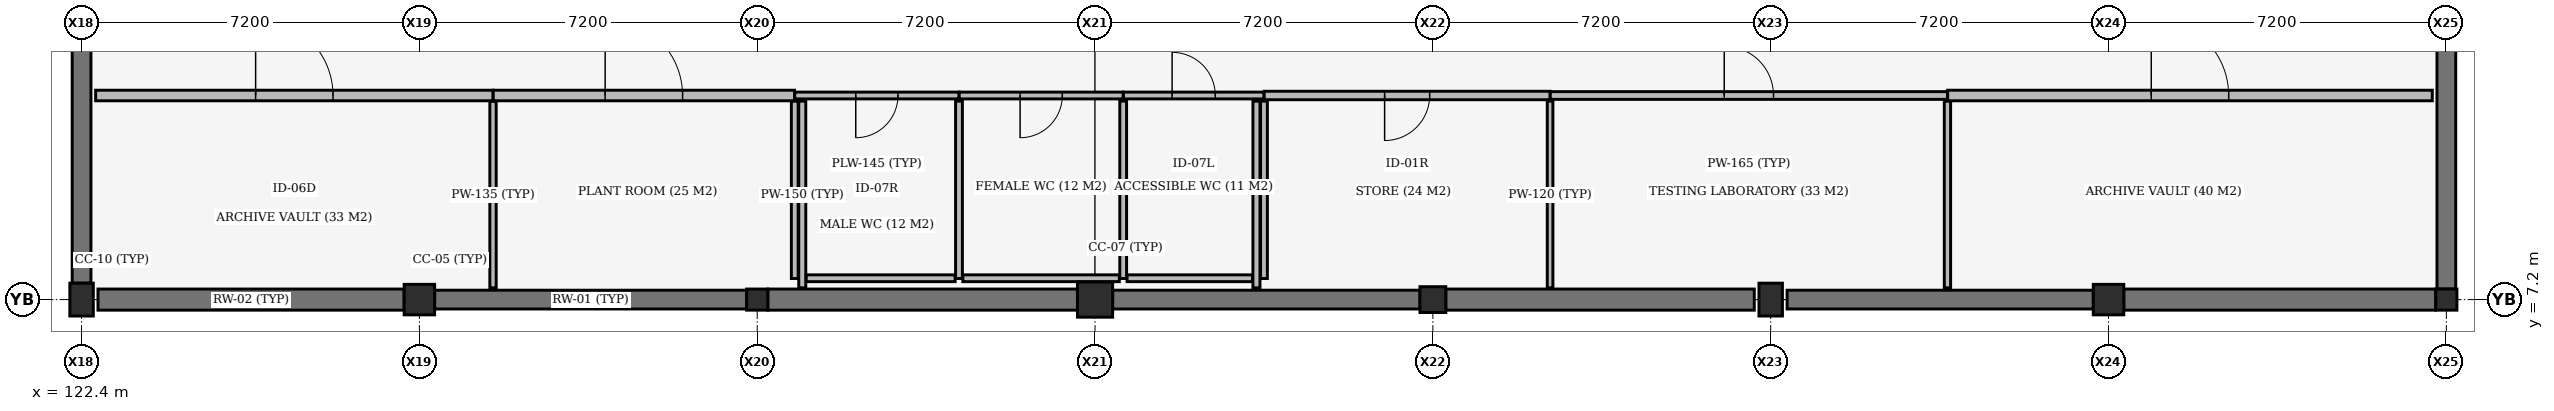
"""IFC4 building model, lengths in metres.
Left out: names, types, materials, properties, quantities, classifications, styles, units other than length and angle.
Written with IfcOpenShell. Run it as: python <this file> out.ifc"""

import sys

from ifc_helpers import new_model, si_unit, direction, frame, frame_2d, origin, origin_2d, place, context, subcontext, project, spatial, rectangle, extrude, element, fill, save


model = new_model("IFC4")
c1 = context("Model", 3, precision=1e-05, world=origin(), true_north=direction((0.0, 1.0)))
c2 = subcontext(c1, "Body", "Model", "MODEL_VIEW")
j1 = project(units=[si_unit("LENGTHUNIT", "METRE"), si_unit("PLANEANGLEUNIT", "RADIAN")], contexts=[c1])
p1 = place(None, origin())
s1 = spatial("IfcSite", under=j1, at=p1, CompositionType="ELEMENT")
p2 = place(p1, origin())
s2 = spatial("IfcBuilding", under=s1, at=p2, CompositionType="ELEMENT")
p3 = place(p2, frame((0.0, 0.0, -4.5)))
s3 = spatial("IfcBuildingStorey", under=s2, at=p3, CompositionType="ELEMENT", Elevation=-4.5)
p4 = place(p3, frame((122.4, 7.2, -0.42), z_axis=(0.0, 0.0, 1.0), x_axis=(1.0, 0.0, 0.0)))
e1 = element("IfcColumn", 1, at=p4, inside=s3, PredefinedType="COLUMN", context=c2, shape_type="SweptSolid", body=[
    extrude(rectangle(XDim=0.5, YDim=0.7, at=origin_2d()), origin(), (0.0, 0.0, 1.0), 4.6),
])
p5 = place(p3, frame((129.6, 7.2, -0.42), z_axis=(0.0, 0.0, 1.0), x_axis=(1.0, 0.0, 0.0)))
e2 = element("IfcColumn", 2, at=p5, inside=s3, PredefinedType="COLUMN", context=c2, shape_type="SweptSolid", body=[
    extrude(rectangle(XDim=0.65, YDim=0.65, at=origin_2d()), origin(), (0.0, 0.0, 1.0), 4.6),
])
p6 = place(p3, frame((136.8, 7.2, -0.42), z_axis=(0.0, 0.0, 1.0), x_axis=(1.0, 0.0, 0.0)))
e3 = element("IfcColumn", 3, at=p6, inside=s3, PredefinedType="COLUMN", context=c2, shape_type="SweptSolid", body=[
    extrude(rectangle(XDim=0.45, YDim=0.45, at=origin_2d()), origin(), (0.0, 0.0, 1.0), 4.6),
])
p7 = place(p3, frame((144.0, 7.2, -0.42), z_axis=(0.0, 0.0, 1.0), x_axis=(1.0, 0.0, 0.0)))
e4 = element("IfcColumn", 4, at=p7, inside=s3, PredefinedType="COLUMN", context=c2, shape_type="SweptSolid", body=[
    extrude(rectangle(XDim=0.75, YDim=0.75, at=origin_2d()), origin(), (0.0, 0.0, 1.0), 4.6),
])
p8 = place(p3, frame((151.2, 7.2, -0.42), z_axis=(0.0, 0.0, 1.0), x_axis=(1.0, 0.0, 0.0)))
e5 = element("IfcColumn", 5, at=p8, inside=s3, PredefinedType="COLUMN", context=c2, shape_type="SweptSolid", body=[
    extrude(rectangle(XDim=0.55, YDim=0.55, at=origin_2d()), origin(), (0.0, 0.0, 1.0), 4.6),
])
p9 = place(p3, frame((158.4, 7.2, -0.42), z_axis=(0.0, 0.0, 1.0), x_axis=(1.0, 0.0, 0.0)))
e6 = element("IfcColumn", 6, at=p9, inside=s3, PredefinedType="COLUMN", context=c2, shape_type="SweptSolid", body=[
    extrude(rectangle(XDim=0.5, YDim=0.7, at=origin_2d()), origin(), (0.0, 0.0, 1.0), 4.6),
])
p10 = place(p3, frame((165.6, 7.2, -0.42), z_axis=(0.0, 0.0, 1.0), x_axis=(1.0, 0.0, 0.0)))
e7 = element("IfcColumn", 7, at=p10, inside=s3, PredefinedType="COLUMN", context=c2, shape_type="SweptSolid", body=[
    extrude(rectangle(XDim=0.65, YDim=0.65, at=origin_2d()), origin(), (0.0, 0.0, 1.0), 4.6),
])
p11 = place(p3, frame((172.8, 7.2, -0.42), z_axis=(0.0, 0.0, 1.0), x_axis=(1.0, 0.0, 0.0)))
e8 = element("IfcColumn", 8, at=p11, inside=s3, PredefinedType="COLUMN", context=c2, shape_type="SweptSolid", body=[
    extrude(rectangle(XDim=0.45, YDim=0.45, at=origin_2d()), origin(), (0.0, 0.0, 1.0), 4.6),
])
p12 = place(p3, frame((122.75, 7.2, 0.0), z_axis=(0.0, 0.0, 1.0), x_axis=(1.0, 0.0, 0.0)))
e9 = element("IfcWall", 9, at=p12, inside=s3, PredefinedType="USERDEFINED", context=c2, shape_type="SweptSolid", body=[
    extrude(rectangle(XDim=6.525, YDim=0.45, at=frame_2d((3.262, 0.0))), origin(), (0.0, 0.0, 1.0), 4.18),
])
p13 = place(p3, frame((129.925, 7.2, 0.0), z_axis=(0.0, 0.0, 1.0), x_axis=(1.0, 0.0, 0.0)))
e10 = element("IfcWall", 10, at=p13, inside=s3, PredefinedType="USERDEFINED", context=c2, shape_type="SweptSolid", body=[
    extrude(rectangle(XDim=6.65, YDim=0.4, at=frame_2d((3.325, 0.0))), origin(), (0.0, 0.0, 1.0), 4.18),
])
p14 = place(p3, frame((137.025, 7.2, 0.0), z_axis=(0.0, 0.0, 1.0), x_axis=(1.0, 0.0, 0.0)))
e11 = element("IfcWall", 11, at=p14, inside=s3, PredefinedType="USERDEFINED", context=c2, shape_type="SweptSolid", body=[
    extrude(rectangle(XDim=6.6, YDim=0.45, at=frame_2d((3.3, 0.0))), origin(), (0.0, 0.0, 1.0), 4.18),
])
p15 = place(p3, frame((144.375, 7.2, 0.0), z_axis=(0.0, 0.0, 1.0), x_axis=(1.0, 0.0, 0.0)))
e12 = element("IfcWall", 12, at=p15, inside=s3, PredefinedType="USERDEFINED", context=c2, shape_type="SweptSolid", body=[
    extrude(rectangle(XDim=6.55, YDim=0.4, at=frame_2d((3.275, 0.0))), origin(), (0.0, 0.0, 1.0), 4.18),
])
p16 = place(p3, frame((151.475, 7.2, 0.0), z_axis=(0.0, 0.0, 1.0), x_axis=(1.0, 0.0, 0.0)))
e13 = element("IfcWall", 13, at=p16, inside=s3, PredefinedType="USERDEFINED", context=c2, shape_type="SweptSolid", body=[
    extrude(rectangle(XDim=6.575, YDim=0.45, at=frame_2d((3.288, 0.0))), origin(), (0.0, 0.0, 1.0), 4.18),
])
p17 = place(p3, frame((158.75, 7.2, 0.0), z_axis=(0.0, 0.0, 1.0), x_axis=(1.0, 0.0, 0.0)))
e14 = element("IfcWall", 14, at=p17, inside=s3, PredefinedType="USERDEFINED", context=c2, shape_type="SweptSolid", body=[
    extrude(rectangle(XDim=6.525, YDim=0.4, at=frame_2d((3.262, 0.0))), origin(), (0.0, 0.0, 1.0), 4.18),
])
p18 = place(p3, frame((165.925, 7.2, 0.0), z_axis=(0.0, 0.0, 1.0), x_axis=(1.0, 0.0, 0.0)))
e15 = element("IfcWall", 15, at=p18, inside=s3, PredefinedType="USERDEFINED", context=c2, shape_type="SweptSolid", body=[
    extrude(rectangle(XDim=6.65, YDim=0.45, at=frame_2d((3.325, 0.0))), origin(), (0.0, 0.0, 1.0), 4.18),
])
p19 = place(p3, frame((122.4, 7.55, 0.0), z_axis=(0.0, 0.0, 1.0), x_axis=(0.0, 1.0, 0.0)))
e16 = element("IfcWall", 16, at=p19, inside=s3, PredefinedType="USERDEFINED", context=c2, shape_type="SweptSolid", body=[
    extrude(rectangle(XDim=6.425, YDim=0.4, at=frame_2d((3.212, 0.0))), origin(), (0.0, 0.0, 1.0), 4.18),
])
p20 = place(p3, frame((172.8, 7.425, 0.0), z_axis=(0.0, 0.0, 1.0), x_axis=(0.0, 1.0, 0.0)))
e17 = element("IfcWall", 17, at=p20, inside=s3, PredefinedType="USERDEFINED", context=c2, shape_type="SweptSolid", body=[
    extrude(rectangle(XDim=6.725, YDim=0.4, at=frame_2d((3.362, 0.0))), origin(), (0.0, 0.0, 1.0), 4.18),
])
p21 = place(p3, frame((137.6, 11.55, 0.0), z_axis=(0.0, 0.0, 1.0), x_axis=(1.0, 0.0, 0.0)))
e18 = element("IfcWall", 18, at=p21, inside=s3, PredefinedType="PLUMBINGWALL", context=c2, shape_type="SweptSolid", body=[
    extrude(rectangle(XDim=3.5, YDim=0.145, at=frame_2d((1.75, 0.0))), origin(), (0.0, 0.0, 1.0), 3.91),
])
p22 = place(p21, frame((1.3, 0.0, 0.0)))
e19 = element("IfcOpeningElement", 19, at=p22, cuts=e18, PredefinedType="OPENING", context=c2, shape_type="SweptSolid", body=[
    extrude(rectangle(XDim=0.9, YDim=2.1, at=frame_2d((0.45, 1.05))), frame((0.0, 0.083, 0.0), z_axis=(0.0, -1.0, 0.0), x_axis=(1.0, 0.0, 0.0)), (0.0, 0.0, 1.0), 0.165),
])
for number, where, z_axis, x_axis in (
    (20, (137.6, 7.65, 0.0), (0.0, 0.0, 1.0), (0.0, 1.0, 0.0)),
    (21, (141.1, 7.65, 0.0), (0.0, 0.0, 1.0), (0.0, 1.0, 0.0)),
):
    element("IfcWall", number, at=place(p3, frame(where, z_axis=z_axis, x_axis=x_axis)), inside=s3, PredefinedType="PLUMBINGWALL", context=c2, shape_type="SweptSolid", body=[
        extrude(rectangle(XDim=3.78, YDim=0.145, at=frame_2d((1.89, 0.0))), origin(), (0.0, 0.0, 1.0), 4.18),
    ])
p23 = place(p3, frame((141.105, 11.55, 0.0), z_axis=(0.0, 0.0, 1.0), x_axis=(1.0, 0.0, 0.0)))
e22 = element("IfcWall", 22, at=p23, inside=s3, PredefinedType="PLUMBINGWALL", context=c2, shape_type="SweptSolid", body=[
    extrude(rectangle(XDim=3.495, YDim=0.145, at=frame_2d((1.748, 0.0))), origin(), (0.0, 0.0, 1.0), 3.58),
])
p24 = place(p23, frame((1.298, 0.0, 0.0)))
e23 = element("IfcOpeningElement", 23, at=p24, cuts=e22, PredefinedType="OPENING", context=c2, shape_type="SweptSolid", body=[
    extrude(rectangle(XDim=0.9, YDim=2.1, at=frame_2d((0.45, 1.05))), frame((0.0, 0.083, 0.0), z_axis=(0.0, -1.0, 0.0), x_axis=(1.0, 0.0, 0.0)), (0.0, 0.0, 1.0), 0.165),
])
p25 = place(p3, frame((144.6, 7.65, 0.0), z_axis=(0.0, 0.0, 1.0), x_axis=(0.0, 1.0, 0.0)))
e24 = element("IfcWall", 24, at=p25, inside=s3, PredefinedType="PLUMBINGWALL", context=c2, shape_type="SweptSolid", body=[
    extrude(rectangle(XDim=3.78, YDim=0.145, at=frame_2d((1.89, 0.0))), origin(), (0.0, 0.0, 1.0), 4.18),
])
p26 = place(p3, frame((144.605, 11.55, 0.0), z_axis=(0.0, 0.0, 1.0), x_axis=(1.0, 0.0, 0.0)))
e25 = element("IfcWall", 25, at=p26, inside=s3, PredefinedType="PLUMBINGWALL", context=c2, shape_type="SweptSolid", body=[
    extrude(rectangle(XDim=2.995, YDim=0.145, at=frame_2d((1.498, 0.0))), origin(), (0.0, 0.0, 1.0), 3.78),
])
p27 = place(p26, frame((1.038, 0.0, 0.0)))
e26 = element("IfcOpeningElement", 26, at=p27, cuts=e25, PredefinedType="OPENING", context=c2, shape_type="SweptSolid", body=[
    extrude(rectangle(XDim=0.92, YDim=2.1, at=frame_2d((0.46, 1.05))), frame((0.0, 0.083, 0.0), z_axis=(0.0, -1.0, 0.0), x_axis=(1.0, 0.0, 0.0)), (0.0, 0.0, 1.0), 0.165),
])
p28 = place(p3, frame((147.6, 7.65, 0.0), z_axis=(0.0, 0.0, 1.0), x_axis=(0.0, 1.0, 0.0)))
e27 = element("IfcWall", 27, at=p28, inside=s3, PredefinedType="PLUMBINGWALL", context=c2, shape_type="SweptSolid", body=[
    extrude(rectangle(XDim=3.78, YDim=0.145, at=frame_2d((1.89, 0.0))), origin(), (0.0, 0.0, 1.0), 4.18),
])
p29 = place(p3, frame((122.7, 11.55, 0.0), z_axis=(0.0, 0.0, 1.0), x_axis=(1.0, 0.0, 0.0)))
e28 = element("IfcWall", 28, at=p29, inside=s3, PredefinedType="STANDARD", context=c2, shape_type="SweptSolid", body=[
    extrude(rectangle(XDim=8.469, YDim=0.225, at=frame_2d((4.234, 0.0))), origin(), (0.0, 0.0, 1.0), 3.53),
])
p30 = place(p29, frame((3.409, 0.0, 0.0)))
e29 = element("IfcOpeningElement", 29, at=p30, cuts=e28, PredefinedType="OPENING", context=c2, shape_type="SweptSolid", body=[
    extrude(rectangle(XDim=1.65, YDim=2.25, at=frame_2d((0.825, 1.125))), frame((0.0, 0.123, 0.0), z_axis=(0.0, -1.0, 0.0), x_axis=(1.0, 0.0, 0.0)), (0.0, 0.0, 1.0), 0.245),
])
p31 = place(p3, frame((131.169, 7.45, 0.0), z_axis=(0.0, 0.0, 1.0), x_axis=(0.0, 1.0, 0.0)))
e30 = element("IfcWall", 30, at=p31, inside=s3, PredefinedType="PARTITIONING", context=c2, shape_type="SweptSolid", body=[
    extrude(rectangle(XDim=3.978, YDim=0.135, at=frame_2d((1.989, 0.0))), origin(), (0.0, 0.0, 1.0), 4.18),
])
p32 = place(p3, frame((131.174, 11.55, 0.0), z_axis=(0.0, 0.0, 1.0), x_axis=(1.0, 0.0, 0.0)))
e31 = element("IfcWall", 31, at=p32, inside=s3, PredefinedType="STANDARD", context=c2, shape_type="SweptSolid", body=[
    extrude(rectangle(XDim=6.421, YDim=0.225, at=frame_2d((3.21, 0.0))), origin(), (0.0, 0.0, 1.0), 3.58),
])
p33 = place(p32, frame((2.385, 0.0, 0.0)))
e32 = element("IfcOpeningElement", 32, at=p33, cuts=e31, PredefinedType="OPENING", context=c2, shape_type="SweptSolid", body=[
    extrude(rectangle(XDim=1.65, YDim=2.25, at=frame_2d((0.825, 1.125))), frame((0.0, 0.123, 0.0), z_axis=(0.0, -1.0, 0.0), x_axis=(1.0, 0.0, 0.0)), (0.0, 0.0, 1.0), 0.245),
])
p34 = place(p3, frame((137.76, 7.45, 0.0), z_axis=(0.0, 0.0, 1.0), x_axis=(0.0, 1.0, 0.0)))
e33 = element("IfcWall", 33, at=p34, inside=s3, PredefinedType="PARTITIONING", context=c2, shape_type="SweptSolid", body=[
    extrude(rectangle(XDim=3.98, YDim=0.15, at=frame_2d((1.99, 0.0))), origin(), (0.0, 0.0, 1.0), 4.18),
])
p35 = place(p3, frame((147.605, 11.55, 0.0), z_axis=(0.0, 0.0, 1.0), x_axis=(1.0, 0.0, 0.0)))
e34 = element("IfcWall", 34, at=p35, inside=s3, PredefinedType="PARTITIONING", context=c2, shape_type="SweptSolid", body=[
    extrude(rectangle(XDim=6.093, YDim=0.18, at=frame_2d((3.046, 0.0))), origin(), (0.0, 0.0, 1.0), 3.58),
])
p36 = place(p35, frame((2.566, 0.0, 0.0)))
e35 = element("IfcOpeningElement", 35, at=p36, cuts=e34, PredefinedType="OPENING", context=c2, shape_type="SweptSolid", body=[
    extrude(rectangle(XDim=0.96, YDim=2.15, at=frame_2d((0.48, 1.075))), frame((0.0, 0.1, 0.0), z_axis=(0.0, -1.0, 0.0), x_axis=(1.0, 0.0, 0.0)), (0.0, 0.0, 1.0), 0.2),
])
p37 = place(p3, frame((147.44, 7.45, 0.0), z_axis=(0.0, 0.0, 1.0), x_axis=(0.0, 1.0, 0.0)))
e36 = element("IfcWall", 36, at=p37, inside=s3, PredefinedType="PARTITIONING", context=c2, shape_type="SweptSolid", body=[
    extrude(rectangle(XDim=3.98, YDim=0.15, at=frame_2d((1.99, 0.0))), origin(), (0.0, 0.0, 1.0), 4.18),
])
p38 = place(p3, frame((153.698, 7.45, 0.0), z_axis=(0.0, 0.0, 1.0), x_axis=(0.0, 1.0, 0.0)))
e37 = element("IfcWall", 37, at=p38, inside=s3, PredefinedType="PARTITIONING", context=c2, shape_type="SweptSolid", body=[
    extrude(rectangle(XDim=3.98, YDim=0.12, at=frame_2d((1.99, 0.0))), origin(), (0.0, 0.0, 1.0), 3.94),
])
p39 = place(p3, frame((153.703, 11.55, 0.0), z_axis=(0.0, 0.0, 1.0), x_axis=(1.0, 0.0, 0.0)))
e38 = element("IfcWall", 38, at=p39, inside=s3, PredefinedType="PARTITIONING", context=c2, shape_type="SweptSolid", body=[
    extrude(rectangle(XDim=8.464, YDim=0.165, at=frame_2d((4.232, 0.0))), origin(), (0.0, 0.0, 1.0), 3.58),
])
p40 = place(p39, frame((3.707, 0.0, 0.0)))
e39 = element("IfcOpeningElement", 39, at=p40, cuts=e38, PredefinedType="OPENING", context=c2, shape_type="SweptSolid", body=[
    extrude(rectangle(XDim=1.05, YDim=2.2, at=frame_2d((0.525, 1.1))), frame((0.0, 0.093, 0.0), z_axis=(0.0, -1.0, 0.0), x_axis=(1.0, 0.0, 0.0)), (0.0, 0.0, 1.0), 0.185),
])
p41 = place(p3, frame((162.167, 7.45, 0.0), z_axis=(0.0, 0.0, 1.0), x_axis=(0.0, 1.0, 0.0)))
e40 = element("IfcWall", 40, at=p41, inside=s3, PredefinedType="PARTITIONING", context=c2, shape_type="SweptSolid", body=[
    extrude(rectangle(XDim=3.98, YDim=0.135, at=frame_2d((1.99, 0.0))), origin(), (0.0, 0.0, 1.0), 4.18),
])
p42 = place(p3, frame((162.172, 11.55, 0.0), z_axis=(0.0, 0.0, 1.0), x_axis=(1.0, 0.0, 0.0)))
e41 = element("IfcWall", 41, at=p42, inside=s3, PredefinedType="STANDARD", context=c2, shape_type="SweptSolid", body=[
    extrude(rectangle(XDim=10.328, YDim=0.225, at=frame_2d((5.164, 0.0))), origin(), (0.0, 0.0, 1.0), 3.38),
])
p43 = place(p42, frame((4.339, 0.0, 0.0)))
e42 = element("IfcOpeningElement", 42, at=p43, cuts=e41, PredefinedType="OPENING", context=c2, shape_type="SweptSolid", body=[
    extrude(rectangle(XDim=1.65, YDim=2.25, at=frame_2d((0.825, 1.125))), frame((0.0, 0.123, 0.0), z_axis=(0.0, -1.0, 0.0), x_axis=(1.0, 0.0, 0.0)), (0.0, 0.0, 1.0), 0.245),
])
p44 = place(p3, frame((137.845, 7.655, 0.0), z_axis=(0.0, 0.0, 1.0), x_axis=(1.0, 0.0, 0.0)))
e43 = element("IfcWall", 43, at=p44, inside=s3, PredefinedType="PLUMBINGWALL", context=c2, shape_type="SweptSolid", body=[
    extrude(rectangle(XDim=3.173, YDim=0.145, at=frame_2d((1.586, 0.0))), origin(), (0.0, 0.0, 1.0), 3.91),
])
p45 = place(p3, frame((141.183, 7.655, 0.0), z_axis=(0.0, 0.0, 1.0), x_axis=(1.0, 0.0, 0.0)))
e44 = element("IfcWall", 44, at=p45, inside=s3, PredefinedType="PLUMBINGWALL", context=c2, shape_type="SweptSolid", body=[
    extrude(rectangle(XDim=3.335, YDim=0.145, at=frame_2d((1.667, 0.0))), origin(), (0.0, 0.0, 1.0), 3.58),
])
p46 = place(p3, frame((144.683, 7.655, 0.0), z_axis=(0.0, 0.0, 1.0), x_axis=(1.0, 0.0, 0.0)))
e45 = element("IfcWall", 45, at=p46, inside=s3, PredefinedType="PLUMBINGWALL", context=c2, shape_type="SweptSolid", body=[
    extrude(rectangle(XDim=2.672, YDim=0.145, at=frame_2d((1.336, 0.0))), origin(), (0.0, 0.0, 1.0), 3.78),
])
p47 = place(p22, origin())
e46 = element("IfcDoor", 46, at=p47, inside=s3, OperationType="SINGLE_SWING_RIGHT", PredefinedType="DOOR", context=c2, shape_type="SweptSolid", body=[
    extrude(rectangle(XDim=0.9, YDim=2.1, at=frame_2d((0.45, 1.05))), frame((0.0, 0.025, 0.0), z_axis=(0.0, -1.0, 0.0), x_axis=(1.0, 0.0, 0.0)), (0.0, 0.0, 1.0), 0.05),
])
fill(e19, e46)
p48 = place(p24, origin())
e47 = element("IfcDoor", 47, at=p48, inside=s3, OperationType="SINGLE_SWING_RIGHT", PredefinedType="DOOR", context=c2, shape_type="SweptSolid", body=[
    extrude(rectangle(XDim=0.9, YDim=2.1, at=frame_2d((0.45, 1.05))), frame((0.0, 0.025, 0.0), z_axis=(0.0, -1.0, 0.0), x_axis=(1.0, 0.0, 0.0)), (0.0, 0.0, 1.0), 0.05),
])
fill(e23, e47)
p49 = place(p27, origin())
e48 = element("IfcDoor", 48, at=p49, inside=s3, OperationType="SINGLE_SWING_LEFT", PredefinedType="DOOR", context=c2, shape_type="SweptSolid", body=[
    extrude(rectangle(XDim=0.92, YDim=2.1, at=frame_2d((0.46, 1.05))), frame((0.0, 0.025, 0.0), z_axis=(0.0, -1.0, 0.0), x_axis=(1.0, 0.0, 0.0)), (0.0, 0.0, 1.0), 0.05),
])
fill(e26, e48)
p50 = place(p30, origin())
e49 = element("IfcDoor", 49, at=p50, inside=s3, OperationType="DOUBLE_DOOR_SINGLE_SWING", PredefinedType="DOOR", context=c2, shape_type="SweptSolid", body=[
    extrude(rectangle(XDim=1.65, YDim=2.25, at=frame_2d((0.825, 1.125))), frame((0.0, 0.025, 0.0), z_axis=(0.0, -1.0, 0.0), x_axis=(1.0, 0.0, 0.0)), (0.0, 0.0, 1.0), 0.05),
])
fill(e29, e49)
p51 = place(p33, origin())
e50 = element("IfcDoor", 50, at=p51, inside=s3, OperationType="DOUBLE_DOOR_SINGLE_SWING", PredefinedType="DOOR", context=c2, shape_type="SweptSolid", body=[
    extrude(rectangle(XDim=1.65, YDim=2.25, at=frame_2d((0.825, 1.125))), frame((0.0, 0.025, 0.0), z_axis=(0.0, -1.0, 0.0), x_axis=(1.0, 0.0, 0.0)), (0.0, 0.0, 1.0), 0.05),
])
fill(e32, e50)
p52 = place(p36, origin())
e51 = element("IfcDoor", 51, at=p52, inside=s3, OperationType="SINGLE_SWING_RIGHT", PredefinedType="DOOR", context=c2, shape_type="SweptSolid", body=[
    extrude(rectangle(XDim=0.96, YDim=2.15, at=frame_2d((0.48, 1.075))), frame((0.0, 0.025, 0.0), z_axis=(0.0, -1.0, 0.0), x_axis=(1.0, 0.0, 0.0)), (0.0, 0.0, 1.0), 0.05),
])
fill(e35, e51)
p53 = place(p40, origin())
e52 = element("IfcDoor", 52, at=p53, inside=s3, OperationType="SINGLE_SWING_LEFT", PredefinedType="DOOR", context=c2, shape_type="SweptSolid", body=[
    extrude(rectangle(XDim=1.05, YDim=2.2, at=frame_2d((0.525, 1.1))), frame((0.0, 0.025, 0.0), z_axis=(0.0, -1.0, 0.0), x_axis=(1.0, 0.0, 0.0)), (0.0, 0.0, 1.0), 0.05),
])
fill(e39, e52)
p54 = place(p43, origin())
e53 = element("IfcDoor", 53, at=p54, inside=s3, OperationType="DOUBLE_DOOR_SINGLE_SWING", PredefinedType="DOOR", context=c2, shape_type="SweptSolid", body=[
    extrude(rectangle(XDim=1.65, YDim=2.25, at=frame_2d((0.825, 1.125))), frame((0.0, 0.025, 0.0), z_axis=(0.0, -1.0, 0.0), x_axis=(1.0, 0.0, 0.0)), (0.0, 0.0, 1.0), 0.05),
])
fill(e42, e53)
save(model, sys.argv[1])
